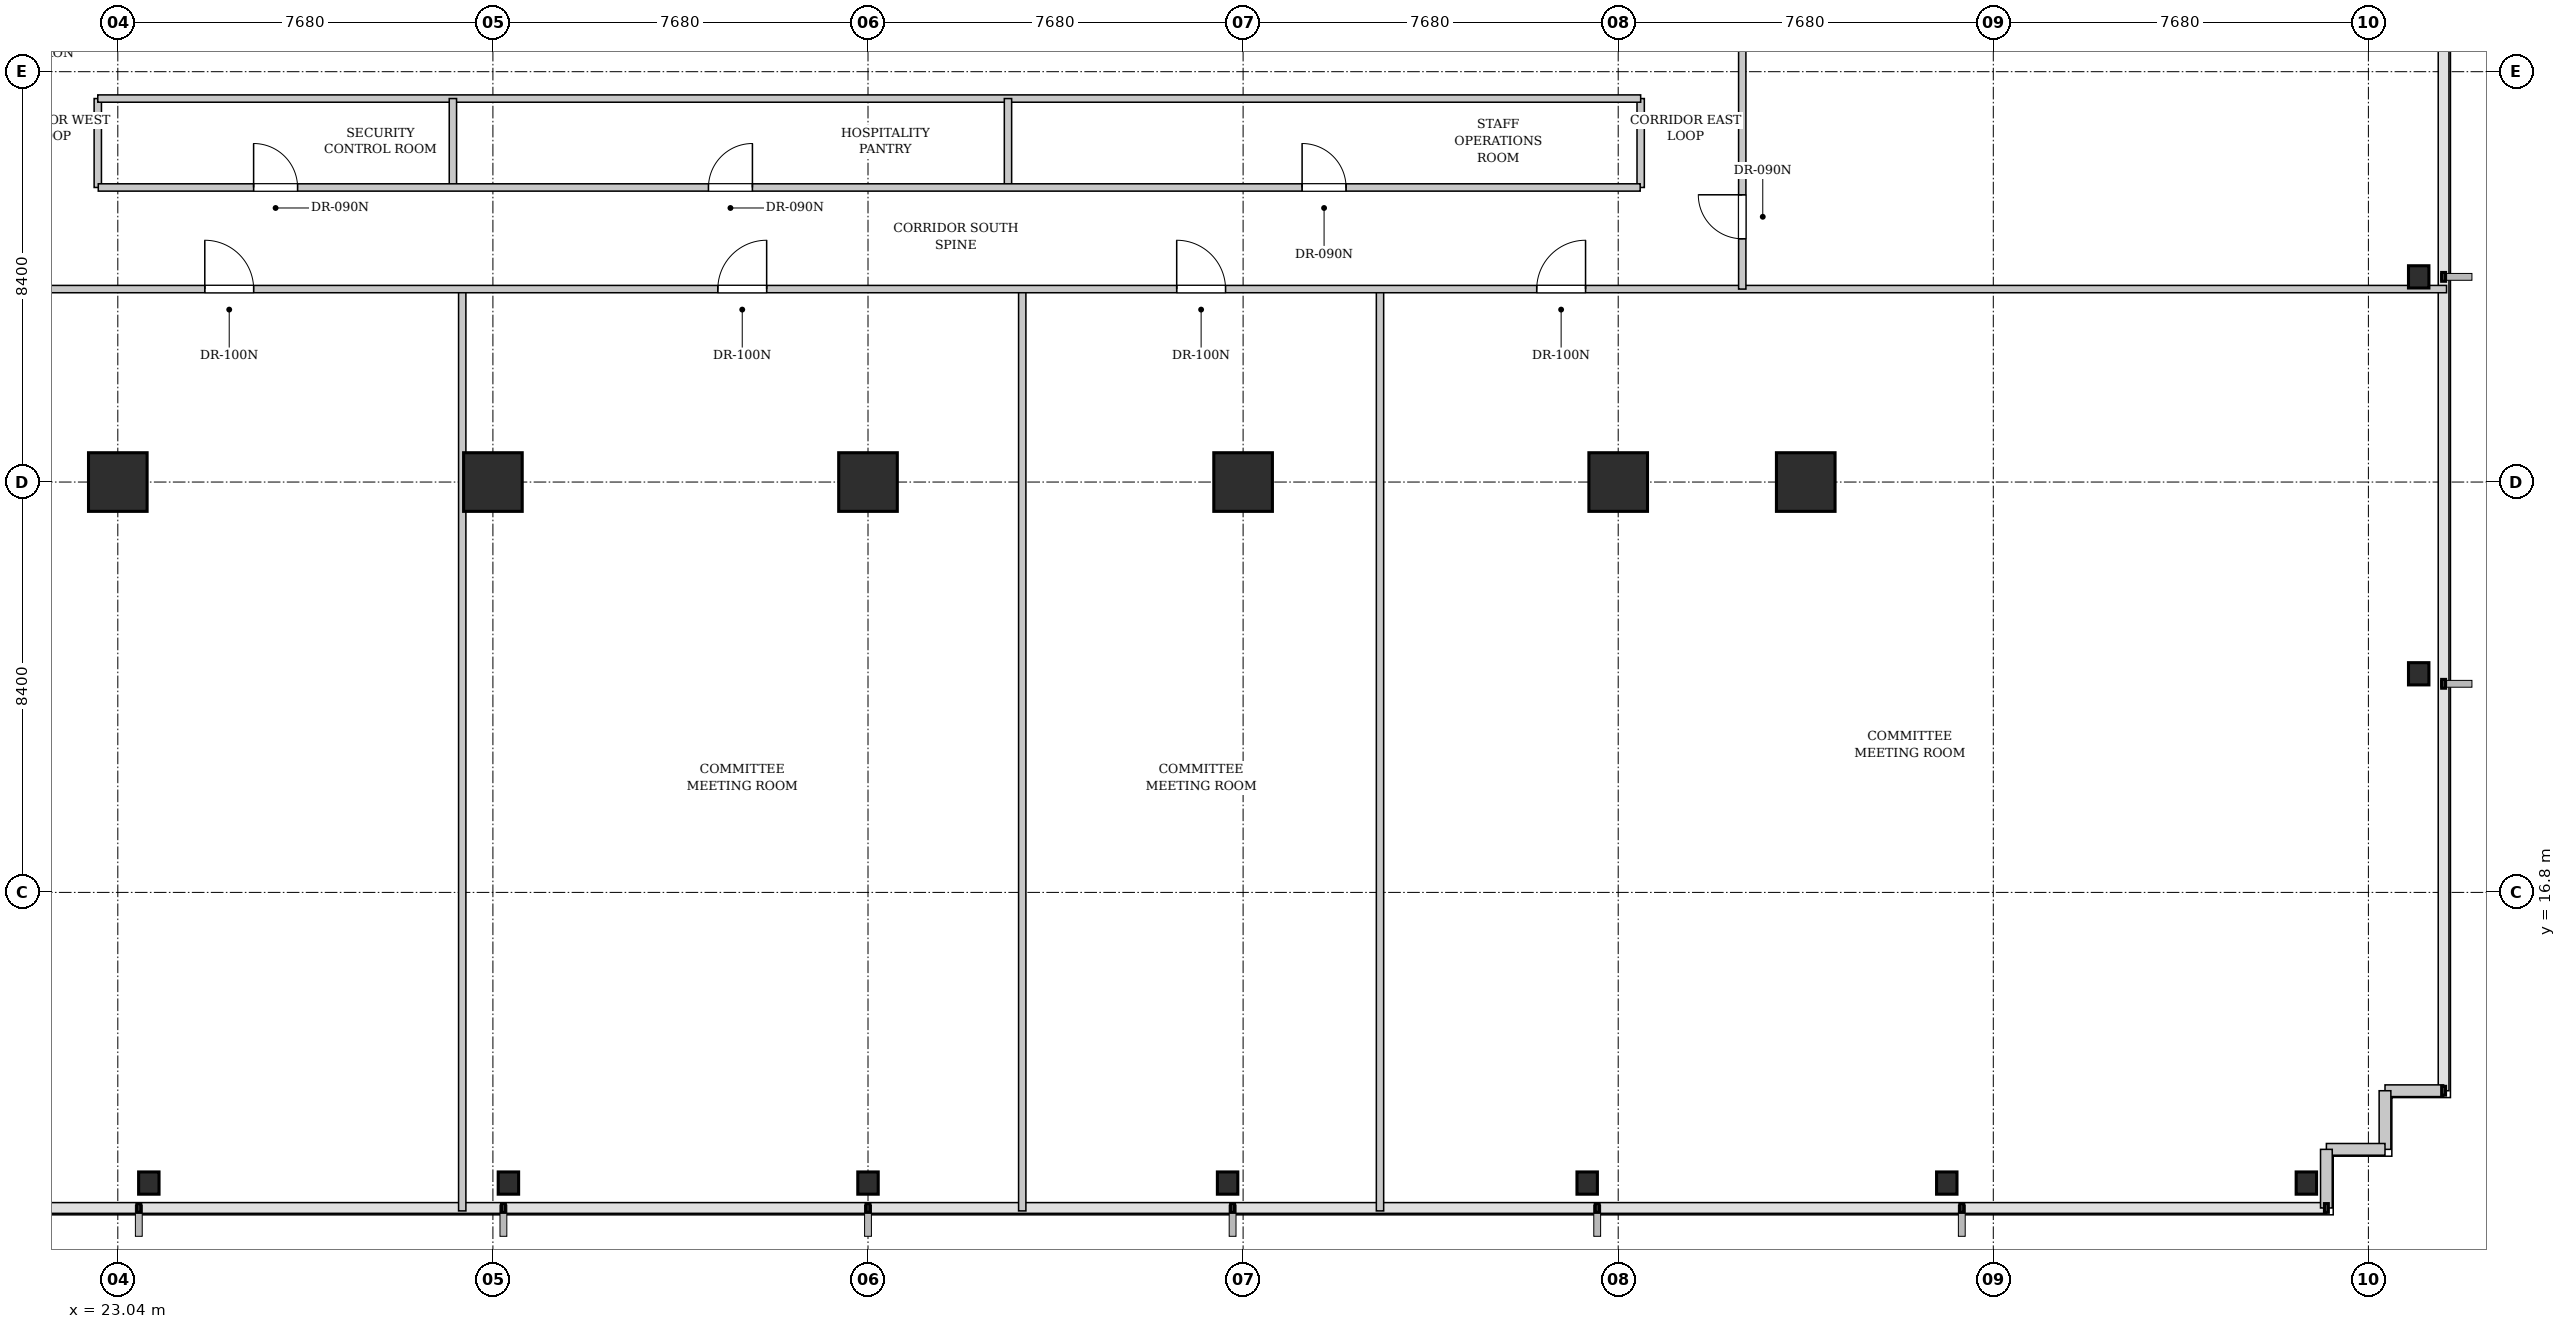
"""IFC4 building model, lengths in metres.
Left out: names, types, materials, properties, quantities, classifications, styles, units other than length and angle.
Written with IfcOpenShell. Run it as: python <this file> out.ifc"""

import sys

from ifc_helpers import new_model, si_unit, direction, frame, frame_2d, origin, origin_2d, place, context, subcontext, project, spatial, rectangle, i_section, extrude, element, fill, save


model = new_model("IFC4")
c1 = context("Model", 3, precision=1e-05, world=origin(), true_north=direction((0.0, 1.0)))
c2 = subcontext(c1, "Body", "Model", "MODEL_VIEW")
j1 = project(units=[si_unit("LENGTHUNIT", "METRE"), si_unit("PLANEANGLEUNIT", "RADIAN")], contexts=[c1])
p1 = place(None, origin())
s1 = spatial("IfcSite", under=j1, at=p1, CompositionType="ELEMENT")
p2 = place(p1, origin())
s2 = spatial("IfcBuilding", under=s1, at=p2, CompositionType="ELEMENT")
p3 = place(p2, frame((0.0, 0.0, 64.4)))
s3 = spatial("IfcBuildingStorey", under=s2, at=p3, CompositionType="ELEMENT", Elevation=64.4)
for number, where, z_axis, x_axis in (
    (1, (23.04, 25.2, 0.0), (0.0, 0.0, 1.0), (1.0, 0.0, 0.0)),
    (2, (30.72, 25.2, 0.0), (0.0, 0.0, 1.0), (1.0, 0.0, 0.0)),
    (3, (38.4, 25.2, 0.0), (0.0, 0.0, 1.0), (1.0, 0.0, 0.0)),
    (4, (46.08, 25.2, 0.0), (0.0, 0.0, 1.0), (1.0, 0.0, 0.0)),
    (5, (53.76, 25.2, 0.0), (0.0, 0.0, 1.0), (1.0, 0.0, 0.0)),
    (6, (57.6, 25.2, 0.0), (0.0, 0.0, 1.0), (1.0, 0.0, 0.0)),
):
    element("IfcColumn", number, at=place(p3, frame(where, z_axis=z_axis, x_axis=x_axis)), inside=s3, PredefinedType="COLUMN", context=c2, shape_type="SweptSolid", body=[
        extrude(rectangle(XDim=1.2, YDim=1.2, at=origin_2d()), origin(), (0.0, 0.0, 1.0), 3.4),
    ])
for number, where, z_axis, x_axis in (
    (7, (23.675, 10.85, 0.0), (0.0, 0.0, 1.0), (1.0, 0.0, 0.0)),
    (8, (31.038, 10.85, 0.0), (0.0, 0.0, 1.0), (1.0, 0.0, 0.0)),
    (9, (38.4, 10.85, 0.0), (0.0, 0.0, 1.0), (1.0, 0.0, 0.0)),
    (10, (45.762, 10.85, 0.0), (0.0, 0.0, 1.0), (1.0, 0.0, 0.0)),
    (11, (53.125, 10.85, 0.0), (0.0, 0.0, 1.0), (1.0, 0.0, 0.0)),
    (12, (60.488, 10.85, 0.0), (0.0, 0.0, 1.0), (1.0, 0.0, 0.0)),
    (13, (67.85, 10.85, 0.0), (0.0, 0.0, 1.0), (1.0, 0.0, 0.0)),
    (14, (70.15, 21.275, 0.0), (0.0, 0.0, 1.0), (1.0, 0.0, 0.0)),
    (15, (70.15, 29.4, 0.0), (0.0, 0.0, 1.0), (1.0, 0.0, 0.0)),
):
    element("IfcColumn", number, at=place(p3, frame(where, z_axis=z_axis, x_axis=x_axis)), inside=s3, PredefinedType="COLUMN", context=c2, shape_type="SweptSolid", body=[
        extrude(i_section(OverallWidth=0.418, OverallDepth=0.455, WebThickness=0.042, FlangeThickness=0.068, FilletRadius=0.015, at=origin_2d()), origin(), (0.0, 0.0, 1.0), 3.4),
    ])
for number, where, z_axis, x_axis in (
    (16, (70.66, 12.74, 0.0), (0.0, 0.0, 1.0), (-1.0, 0.0, 0.0)),
    (17, (69.46, 12.74, 0.0), (0.0, 0.0, 1.0), (0.0, -1.0, 0.0)),
    (18, (69.46, 11.54, 0.0), (0.0, 0.0, 1.0), (-1.0, 0.0, 0.0)),
    (19, (68.26, 11.54, 0.0), (0.0, 0.0, 1.0), (0.0, -1.0, 0.0)),
):
    element("IfcWall", number, at=place(p3, frame(where, z_axis=z_axis, x_axis=x_axis)), inside=s3, PredefinedType="SOLIDWALL", context=c2, shape_type="SweptSolid", body=[
        extrude(rectangle(XDim=1.2, YDim=0.24, at=frame_2d((0.6, 0.0))), origin(), (0.0, 0.0, 1.0), 3.18),
    ])
for number, where, z_axis, x_axis in (
    (20, (30.092, 10.28, 0.0), (0.0, 0.0, 1.0), (0.0, 1.0, 0.0)),
    (21, (41.558, 10.28, 0.0), (0.0, 0.0, 1.0), (0.0, 1.0, 0.0)),
    (22, (48.883, 10.28, 0.0), (0.0, 0.0, 1.0), (0.0, 1.0, 0.0)),
):
    element("IfcWall", number, at=place(p3, frame(where, z_axis=z_axis, x_axis=x_axis)), inside=s3, PredefinedType="PARTITIONING", context=c2, shape_type="SweptSolid", body=[
        extrude(rectangle(XDim=18.89, YDim=0.15, at=frame_2d((9.445, 0.0))), origin(), (0.0, 0.0, 1.0), 3.18),
    ])
p4 = place(p3, frame((6.08, 29.15, 0.0), z_axis=(0.0, 0.0, 1.0), x_axis=(1.0, 0.0, 0.0)))
e23 = element("IfcWall", 23, at=p4, inside=s3, PredefinedType="PARTITIONING", context=c2, shape_type="SweptSolid", body=[
    extrude(rectangle(XDim=64.64, YDim=0.15, at=frame_2d((32.32, 0.0))), origin(), (0.0, 0.0, 1.0), 3.18),
])
p5 = place(p4, frame((18.741, 0.0, 0.0)))
e24 = element("IfcOpeningElement", 24, at=p5, cuts=e23, PredefinedType="OPENING", context=c2, shape_type="SweptSolid", body=[
    extrude(rectangle(XDim=1.0, YDim=2.15, at=frame_2d((0.5, 1.075))), frame((0.0, 0.085, 0.0), z_axis=(0.0, -1.0, 0.0), x_axis=(1.0, 0.0, 0.0)), (0.0, 0.0, 1.0), 0.17),
])
p6 = place(p4, frame((29.245, 0.0, 0.0)))
e25 = element("IfcOpeningElement", 25, at=p6, cuts=e23, PredefinedType="OPENING", context=c2, shape_type="SweptSolid", body=[
    extrude(rectangle(XDim=1.0, YDim=2.15, at=frame_2d((0.5, 1.075))), frame((0.0, 0.085, 0.0), z_axis=(0.0, -1.0, 0.0), x_axis=(1.0, 0.0, 0.0)), (0.0, 0.0, 1.0), 0.17),
])
p7 = place(p4, frame((38.64, 0.0, 0.0)))
e26 = element("IfcOpeningElement", 26, at=p7, cuts=e23, PredefinedType="OPENING", context=c2, shape_type="SweptSolid", body=[
    extrude(rectangle(XDim=1.0, YDim=2.15, at=frame_2d((0.5, 1.075))), frame((0.0, 0.085, 0.0), z_axis=(0.0, -1.0, 0.0), x_axis=(1.0, 0.0, 0.0)), (0.0, 0.0, 1.0), 0.17),
])
p8 = place(p4, frame((46.011, 0.0, 0.0)))
e27 = element("IfcOpeningElement", 27, at=p8, cuts=e23, PredefinedType="OPENING", context=c2, shape_type="SweptSolid", body=[
    extrude(rectangle(XDim=1.0, YDim=2.15, at=frame_2d((0.5, 1.075))), frame((0.0, 0.085, 0.0), z_axis=(0.0, -1.0, 0.0), x_axis=(1.0, 0.0, 0.0)), (0.0, 0.0, 1.0), 0.17),
])
p9 = place(p3, frame((56.3, 29.15, 0.0), z_axis=(0.0, 0.0, 1.0), x_axis=(0.0, 1.0, 0.0)))
e28 = element("IfcWall", 28, at=p9, inside=s3, PredefinedType="PARTITIONING", context=c2, shape_type="SweptSolid", body=[
    extrude(rectangle(XDim=19.37, YDim=0.15, at=frame_2d((9.685, 0.0))), origin(), (0.0, 0.0, 1.0), 3.18),
])
p10 = place(p9, frame((1.03, 0.0, 0.0)))
e29 = element("IfcOpeningElement", 29, at=p10, cuts=e28, PredefinedType="OPENING", context=c2, shape_type="SweptSolid", body=[
    extrude(rectangle(XDim=0.9, YDim=2.15, at=frame_2d((0.45, 1.075))), frame((0.0, 0.085, 0.0), z_axis=(0.0, -1.0, 0.0), x_axis=(1.0, 0.0, 0.0)), (0.0, 0.0, 1.0), 0.17),
])
for number, where, z_axis, x_axis in (
    (30, (22.63, 31.23, 0.0), (0.0, 0.0, 1.0), (0.0, 1.0, 0.0)),
    (31, (54.22, 31.23, 0.0), (0.0, 0.0, 1.0), (0.0, 1.0, 0.0)),
):
    element("IfcWall", number, at=place(p3, frame(where, z_axis=z_axis, x_axis=x_axis)), inside=s3, PredefinedType="PARTITIONING", context=c2, shape_type="SweptSolid", body=[
        extrude(rectangle(XDim=1.82, YDim=0.15, at=frame_2d((0.91, 0.0))), origin(), (0.0, 0.0, 1.0), 3.18),
    ])
p11 = place(p3, frame((22.63, 33.05, 0.0), z_axis=(0.0, 0.0, 1.0), x_axis=(1.0, 0.0, 0.0)))
e32 = element("IfcWall", 32, at=p11, inside=s3, PredefinedType="PARTITIONING", context=c2, shape_type="SweptSolid", body=[
    extrude(rectangle(XDim=31.59, YDim=0.15, at=frame_2d((15.795, 0.0))), origin(), (0.0, 0.0, 1.0), 3.18),
])
for number, where, z_axis, x_axis in (
    (33, (29.901, 31.23, 0.0), (0.0, 0.0, 1.0), (0.0, 1.0, 0.0)),
    (34, (41.266, 31.23, 0.0), (0.0, 0.0, 1.0), (0.0, 1.0, 0.0)),
):
    element("IfcWall", number, at=place(p3, frame(where, z_axis=z_axis, x_axis=x_axis)), inside=s3, PredefinedType="PARTITIONING", context=c2, shape_type="SweptSolid", body=[
        extrude(rectangle(XDim=1.82, YDim=0.15, at=frame_2d((0.91, 0.0))), origin(), (0.0, 0.0, 1.0), 3.18),
    ])
p12 = place(p3, frame((22.64, 31.23, 0.0), z_axis=(0.0, 0.0, 1.0), x_axis=(1.0, 0.0, 0.0)))
e35 = element("IfcWall", 35, at=p12, inside=s3, PredefinedType="PARTITIONING", context=c2, shape_type="SweptSolid", body=[
    extrude(rectangle(XDim=31.57, YDim=0.15, at=frame_2d((15.785, 0.0))), origin(), (0.0, 0.0, 1.0), 3.18),
])
p13 = place(p12, frame((3.18, 0.0, 0.0)))
e36 = element("IfcOpeningElement", 36, at=p13, cuts=e35, PredefinedType="OPENING", context=c2, shape_type="SweptSolid", body=[
    extrude(rectangle(XDim=0.9, YDim=2.15, at=frame_2d((0.45, 1.075))), frame((0.0, 0.085, 0.0), z_axis=(0.0, -1.0, 0.0), x_axis=(1.0, 0.0, 0.0)), (0.0, 0.0, 1.0), 0.17),
])
p14 = place(p12, frame((12.493, 0.0, 0.0)))
e37 = element("IfcOpeningElement", 37, at=p14, cuts=e35, PredefinedType="OPENING", context=c2, shape_type="SweptSolid", body=[
    extrude(rectangle(XDim=0.9, YDim=2.15, at=frame_2d((0.45, 1.075))), frame((0.0, 0.085, 0.0), z_axis=(0.0, -1.0, 0.0), x_axis=(1.0, 0.0, 0.0)), (0.0, 0.0, 1.0), 0.17),
])
p15 = place(p12, frame((24.648, 0.0, 0.0)))
e38 = element("IfcOpeningElement", 38, at=p15, cuts=e35, PredefinedType="OPENING", context=c2, shape_type="SweptSolid", body=[
    extrude(rectangle(XDim=0.9, YDim=2.15, at=frame_2d((0.45, 1.075))), frame((0.0, 0.085, 0.0), z_axis=(0.0, -1.0, 0.0), x_axis=(1.0, 0.0, 0.0)), (0.0, 0.0, 1.0), 0.17),
])
p16 = place(p5, origin())
e39 = element("IfcDoor", 39, at=p16, inside=s3, OperationType="SINGLE_SWING_LEFT", PredefinedType="DOOR", context=c2, shape_type="SweptSolid", body=[
    extrude(rectangle(XDim=1.0, YDim=2.15, at=frame_2d((0.5, 1.075))), frame((0.0, 0.025, 0.0), z_axis=(0.0, -1.0, 0.0), x_axis=(1.0, 0.0, 0.0)), (0.0, 0.0, 1.0), 0.05),
])
fill(e24, e39)
p17 = place(p6, origin())
e40 = element("IfcDoor", 40, at=p17, inside=s3, OperationType="SINGLE_SWING_RIGHT", PredefinedType="DOOR", context=c2, shape_type="SweptSolid", body=[
    extrude(rectangle(XDim=1.0, YDim=2.15, at=frame_2d((0.5, 1.075))), frame((0.0, 0.025, 0.0), z_axis=(0.0, -1.0, 0.0), x_axis=(1.0, 0.0, 0.0)), (0.0, 0.0, 1.0), 0.05),
])
fill(e25, e40)
p18 = place(p7, origin())
e41 = element("IfcDoor", 41, at=p18, inside=s3, OperationType="SINGLE_SWING_LEFT", PredefinedType="DOOR", context=c2, shape_type="SweptSolid", body=[
    extrude(rectangle(XDim=1.0, YDim=2.15, at=frame_2d((0.5, 1.075))), frame((0.0, 0.025, 0.0), z_axis=(0.0, -1.0, 0.0), x_axis=(1.0, 0.0, 0.0)), (0.0, 0.0, 1.0), 0.05),
])
fill(e26, e41)
p19 = place(p8, origin())
e42 = element("IfcDoor", 42, at=p19, inside=s3, OperationType="SINGLE_SWING_RIGHT", PredefinedType="DOOR", context=c2, shape_type="SweptSolid", body=[
    extrude(rectangle(XDim=1.0, YDim=2.15, at=frame_2d((0.5, 1.075))), frame((0.0, 0.025, 0.0), z_axis=(0.0, -1.0, 0.0), x_axis=(1.0, 0.0, 0.0)), (0.0, 0.0, 1.0), 0.05),
])
fill(e27, e42)
p20 = place(p10, origin())
e43 = element("IfcDoor", 43, at=p20, inside=s3, OperationType="SINGLE_SWING_RIGHT", PredefinedType="DOOR", context=c2, shape_type="SweptSolid", body=[
    extrude(rectangle(XDim=0.9, YDim=2.15, at=frame_2d((0.45, 1.075))), frame((0.0, 0.025, 0.0), z_axis=(0.0, -1.0, 0.0), x_axis=(1.0, 0.0, 0.0)), (0.0, 0.0, 1.0), 0.05),
])
fill(e29, e43)
p21 = place(p13, origin())
e44 = element("IfcDoor", 44, at=p21, inside=s3, OperationType="SINGLE_SWING_LEFT", PredefinedType="DOOR", context=c2, shape_type="SweptSolid", body=[
    extrude(rectangle(XDim=0.9, YDim=2.15, at=frame_2d((0.45, 1.075))), frame((0.0, 0.025, 0.0), z_axis=(0.0, -1.0, 0.0), x_axis=(1.0, 0.0, 0.0)), (0.0, 0.0, 1.0), 0.05),
])
fill(e36, e44)
p22 = place(p14, origin())
e45 = element("IfcDoor", 45, at=p22, inside=s3, OperationType="SINGLE_SWING_RIGHT", PredefinedType="DOOR", context=c2, shape_type="SweptSolid", body=[
    extrude(rectangle(XDim=0.9, YDim=2.15, at=frame_2d((0.45, 1.075))), frame((0.0, 0.025, 0.0), z_axis=(0.0, -1.0, 0.0), x_axis=(1.0, 0.0, 0.0)), (0.0, 0.0, 1.0), 0.05),
])
fill(e37, e45)
p23 = place(p15, origin())
e46 = element("IfcDoor", 46, at=p23, inside=s3, OperationType="SINGLE_SWING_LEFT", PredefinedType="DOOR", context=c2, shape_type="SweptSolid", body=[
    extrude(rectangle(XDim=0.9, YDim=2.15, at=frame_2d((0.45, 1.075))), frame((0.0, 0.025, 0.0), z_axis=(0.0, -1.0, 0.0), x_axis=(1.0, 0.0, 0.0)), (0.0, 0.0, 1.0), 0.05),
])
fill(e38, e46)
save(model, sys.argv[1])
